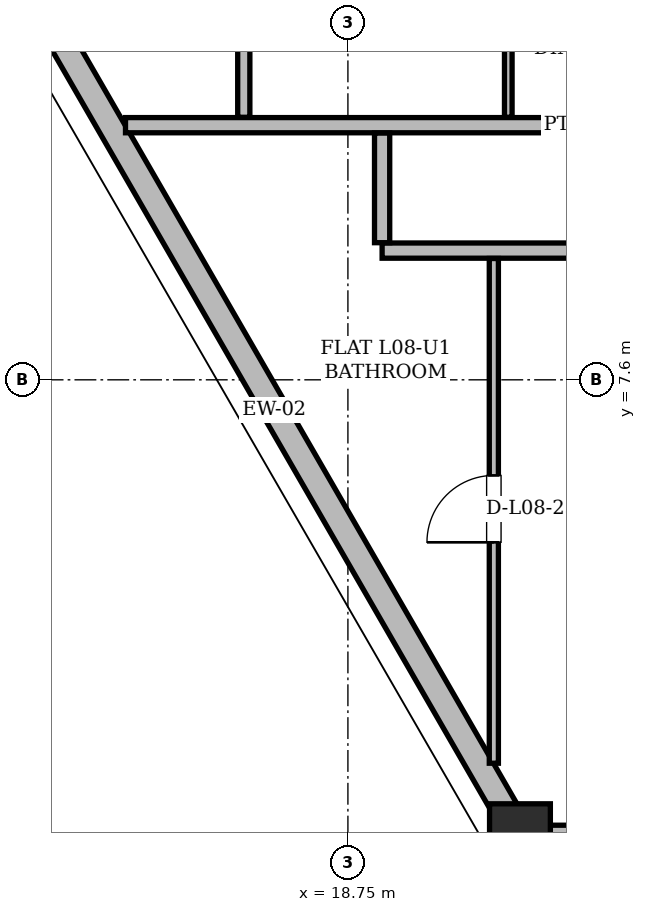
"""IFC4 building model, lengths in metres.
Left out: names, types, materials, properties, quantities, classifications, styles, units other than length and angle.
Written with IfcOpenShell. Run it as: python <this file> out.ifc"""

import sys

from ifc_helpers import new_model, si_unit, direction, frame, frame_2d, origin, origin_2d, place, context, subcontext, project, spatial, rectangle, hollow_rectangle, extrude, element, fill, save


model = new_model("IFC4")
c1 = context("Model", 3, precision=1e-05, world=origin(), true_north=direction((0.0, 1.0)))
c2 = subcontext(c1, "Body", "Model", "MODEL_VIEW")
j1 = project(units=[si_unit("LENGTHUNIT", "METRE"), si_unit("PLANEANGLEUNIT", "RADIAN")], contexts=[c1])
p1 = place(None, origin())
s1 = spatial("IfcSite", under=j1, at=p1, CompositionType="ELEMENT")
p2 = place(p1, origin())
s2 = spatial("IfcBuilding", under=s1, at=p2, CompositionType="ELEMENT")
p3 = place(p2, frame((0.0, 0.0, 34.5)))
s3 = spatial("IfcBuildingStorey", under=s2, at=p3, CompositionType="ELEMENT", Elevation=34.5)
p4 = place(p3, frame((21.038, 1.57, 0.004), z_axis=(-0.013658155039, 0.02881123252, 0.999491554582), x_axis=(-0.903607613732, -0.42836115651, 0.0)))
e1 = element("IfcColumn", 1, at=p4, inside=s3, PredefinedType="COLUMN", context=c2, shape_type="SweptSolid", body=[
    extrude(hollow_rectangle(XDim=0.8, YDim=0.8, WallThickness=0.065, at=origin_2d()), origin(), (0.0, 0.0, 1.0), 3.593),
])
p5 = place(p3, frame((13.222, 15.108, 0.0), z_axis=(0.0, 0.0, 1.0), x_axis=(0.499997339613, -0.866026939754, 0.0)))
e2 = element("IfcWall", 2, at=p5, inside=s3, PredefinedType="SOLIDWALL", context=c2, shape_type="SweptSolid", body=[
    extrude(rectangle(XDim=15.632, YDim=0.34, at=frame_2d((7.816, 0.0))), origin(), (0.0, 0.0, 1.0), 2.494),
])
p6 = place(p5, frame((1.411, 0.0, 1.28)))
e3 = element("IfcOpeningElement", 3, at=p6, cuts=e2, PredefinedType="OPENING", context=c2, shape_type="SweptSolid", body=[
    extrude(rectangle(XDim=0.85, YDim=0.92, at=frame_2d((0.425, 0.46))), frame((0.0, 0.17, 0.0), z_axis=(0.0, -1.0, 0.0), x_axis=(1.0, 0.0, 0.0)), (0.0, 0.0, 1.0), 0.34),
])
p7 = place(p3, frame((21.038, 1.57, 0.0), z_axis=(0.0, 0.0, 1.0), x_axis=(1.0, 0.0, 0.0)))
e4 = element("IfcWall", 4, at=p7, inside=s3, PredefinedType="SOLIDWALL", context=c2, shape_type="SweptSolid", body=[
    extrude(rectangle(XDim=32.924, YDim=0.34, at=frame_2d((16.462, 0.0))), origin(), (0.0, 0.0, 1.0), 2.494),
])
p8 = place(p7, frame((6.159, 0.0, 0.0)))
e5 = element("IfcOpeningElement", 5, at=p8, cuts=e4, PredefinedType="OPENING", context=c2, shape_type="SweptSolid", body=[
    extrude(rectangle(XDim=1.5, YDim=2.2, at=frame_2d((0.75, 1.1))), frame((0.0, 0.17, 0.0), z_axis=(0.0, -1.0, 0.0), x_axis=(1.0, 0.0, 0.0)), (0.0, 0.0, 1.0), 0.34),
])
p9 = place(p7, frame((23.809, 0.0, 0.0)))
e6 = element("IfcOpeningElement", 6, at=p9, cuts=e4, PredefinedType="OPENING", context=c2, shape_type="SweptSolid", body=[
    extrude(rectangle(XDim=1.5, YDim=2.2, at=frame_2d((0.75, 1.1))), frame((0.0, 0.17, 0.0), z_axis=(0.0, -1.0, 0.0), x_axis=(1.0, 0.0, 0.0)), (0.0, 0.0, 1.0), 0.34),
])
p10 = place(p7, frame((1.433, 0.0, 0.85)))
e7 = element("IfcOpeningElement", 7, at=p10, cuts=e4, PredefinedType="OPENING", context=c2, shape_type="SweptSolid", body=[
    extrude(rectangle(XDim=2.4, YDim=1.534, at=frame_2d((1.2, 0.767))), frame((0.0, 0.17, 0.0), z_axis=(0.0, -1.0, 0.0), x_axis=(1.0, 0.0, 0.0)), (0.0, 0.0, 1.0), 0.34),
])
p11 = place(p7, frame((10.518, 0.0, 0.85)))
e8 = element("IfcOpeningElement", 8, at=p11, cuts=e4, PredefinedType="OPENING", context=c2, shape_type="SweptSolid", body=[
    extrude(rectangle(XDim=1.2, YDim=1.48, at=frame_2d((0.6, 0.74))), frame((0.0, 0.17, 0.0), z_axis=(0.0, -1.0, 0.0), x_axis=(1.0, 0.0, 0.0)), (0.0, 0.0, 1.0), 0.34),
])
p12 = place(p7, frame((15.126, 0.0, 0.85)))
e9 = element("IfcOpeningElement", 9, at=p12, cuts=e4, PredefinedType="OPENING", context=c2, shape_type="SweptSolid", body=[
    extrude(rectangle(XDim=2.0, YDim=1.534, at=frame_2d((1.0, 0.767))), frame((0.0, 0.17, 0.0), z_axis=(0.0, -1.0, 0.0), x_axis=(1.0, 0.0, 0.0)), (0.0, 0.0, 1.0), 0.34),
])
p13 = place(p7, frame((28.766, 0.0, 0.85)))
e10 = element("IfcOpeningElement", 10, at=p13, cuts=e4, PredefinedType="OPENING", context=c2, shape_type="SweptSolid", body=[
    extrude(rectangle(XDim=1.4, YDim=1.534, at=frame_2d((0.7, 0.767))), frame((0.0, 0.17, 0.0), z_axis=(0.0, -1.0, 0.0), x_axis=(1.0, 0.0, 0.0)), (0.0, 0.0, 1.0), 0.34),
])
p14 = place(p3, frame((19.2, 9.3, 0.0), z_axis=(0.0, 0.0, 1.0), x_axis=(1.0, 0.0, 0.0)))
e11 = element("IfcWall", 11, at=p14, inside=s3, PredefinedType="PARTITIONING", context=c2, shape_type="SweptSolid", body=[
    extrude(rectangle(XDim=36.6, YDim=0.2, at=frame_2d((18.3, 0.0))), origin(), (0.0, 0.0, 1.0), 2.738),
])
p15 = place(p14, frame((6.638, 0.0, 0.0)))
e12 = element("IfcOpeningElement", 12, at=p15, cuts=e11, PredefinedType="OPENING", context=c2, shape_type="SweptSolid", body=[
    extrude(rectangle(XDim=1.0, YDim=2.18, at=frame_2d((0.5, 1.09))), frame((0.0, 0.1, 0.0), z_axis=(0.0, -1.0, 0.0), x_axis=(1.0, 0.0, 0.0)), (0.0, 0.0, 1.0), 0.2),
])
p16 = place(p14, frame((23.642, 0.0, 0.0)))
e13 = element("IfcOpeningElement", 13, at=p16, cuts=e11, PredefinedType="OPENING", context=c2, shape_type="SweptSolid", body=[
    extrude(rectangle(XDim=1.0, YDim=2.18, at=frame_2d((0.5, 1.09))), frame((0.0, 0.1, 0.0), z_axis=(0.0, -1.0, 0.0), x_axis=(1.0, 0.0, 0.0)), (0.0, 0.0, 1.0), 0.2),
])
p17 = place(p3, frame((15.824, 10.95, 0.0), z_axis=(0.0, 0.0, 1.0), x_axis=(1.0, 0.0, 0.0)))
e14 = element("IfcWall", 14, at=p17, inside=s3, PredefinedType="PARTITIONING", context=c2, shape_type="SweptSolid", body=[
    extrude(rectangle(XDim=11.726, YDim=0.2, at=frame_2d((5.863, 0.0))), origin(), (0.0, 0.0, 1.0), 3.36),
])
p18 = place(p3, frame((17.38, 11.054, 0.0), z_axis=(0.0, 0.0, 1.0), x_axis=(0.0, 1.0, 0.0)))
e15 = element("IfcWall", 15, at=p18, inside=s3, PredefinedType="PARTITIONING", context=c2, shape_type="SweptSolid", body=[
    extrude(rectangle(XDim=3.572, YDim=0.16, at=frame_2d((1.786, 0.0))), origin(), (0.0, 0.0, 1.0), 2.738),
])
p19 = place(p3, frame((19.2, 9.404, 0.0), z_axis=(0.0, 0.0, 1.0), x_axis=(0.0, 1.0, 0.0)))
e16 = element("IfcWall", 16, at=p19, inside=s3, PredefinedType="PARTITIONING", context=c2, shape_type="SweptSolid", body=[
    extrude(rectangle(XDim=1.442, YDim=0.2, at=frame_2d((0.721, 0.0))), origin(), (0.0, 0.0, 1.0), 3.36),
])
p20 = place(p3, frame((20.67, 2.556, 0.0), z_axis=(0.0, 0.0, 1.0), x_axis=(0.0, 1.0, 0.0)))
e17 = element("IfcWall", 17, at=p20, inside=s3, PredefinedType="PARTITIONING", context=c2, shape_type="SweptSolid", body=[
    extrude(rectangle(XDim=6.64, YDim=0.12, at=frame_2d((3.32, 0.0))), origin(), (0.0, 0.0, 1.0), 3.36),
])
p21 = place(p20, frame((2.906, 0.0, 0.0)))
e18 = element("IfcOpeningElement", 18, at=p21, cuts=e17, PredefinedType="OPENING", context=c2, shape_type="SweptSolid", body=[
    extrude(rectangle(XDim=0.88, YDim=2.08, at=frame_2d((0.44, 1.04))), frame((0.0, 0.06, 0.0), z_axis=(0.0, -1.0, 0.0), x_axis=(1.0, 0.0, 0.0)), (0.0, 0.0, 1.0), 0.12),
])
p22 = place(p3, frame((20.86, 11.054, 0.0), z_axis=(0.0, 0.0, 1.0), x_axis=(0.0, 1.0, 0.0)))
e19 = element("IfcWall", 19, at=p22, inside=s3, PredefinedType="PARTITIONING", context=c2, shape_type="SweptSolid", body=[
    extrude(rectangle(XDim=3.572, YDim=0.1, at=frame_2d((1.786, 0.0))), origin(), (0.0, 0.0, 1.0), 2.738),
])
p23 = place(p21, origin())
e20 = element("IfcDoor", 20, at=p23, inside=s3, OperationType="SINGLE_SWING_LEFT", PredefinedType="DOOR", context=c2, shape_type="SweptSolid", body=[
    extrude(rectangle(XDim=0.88, YDim=2.08, at=frame_2d((0.44, 1.04))), frame((0.0, 0.025, 0.0), z_axis=(0.0, -1.0, 0.0), x_axis=(1.0, 0.0, 0.0)), (0.0, 0.0, 1.0), 0.05),
])
fill(e18, e20)
save(model, sys.argv[1])
